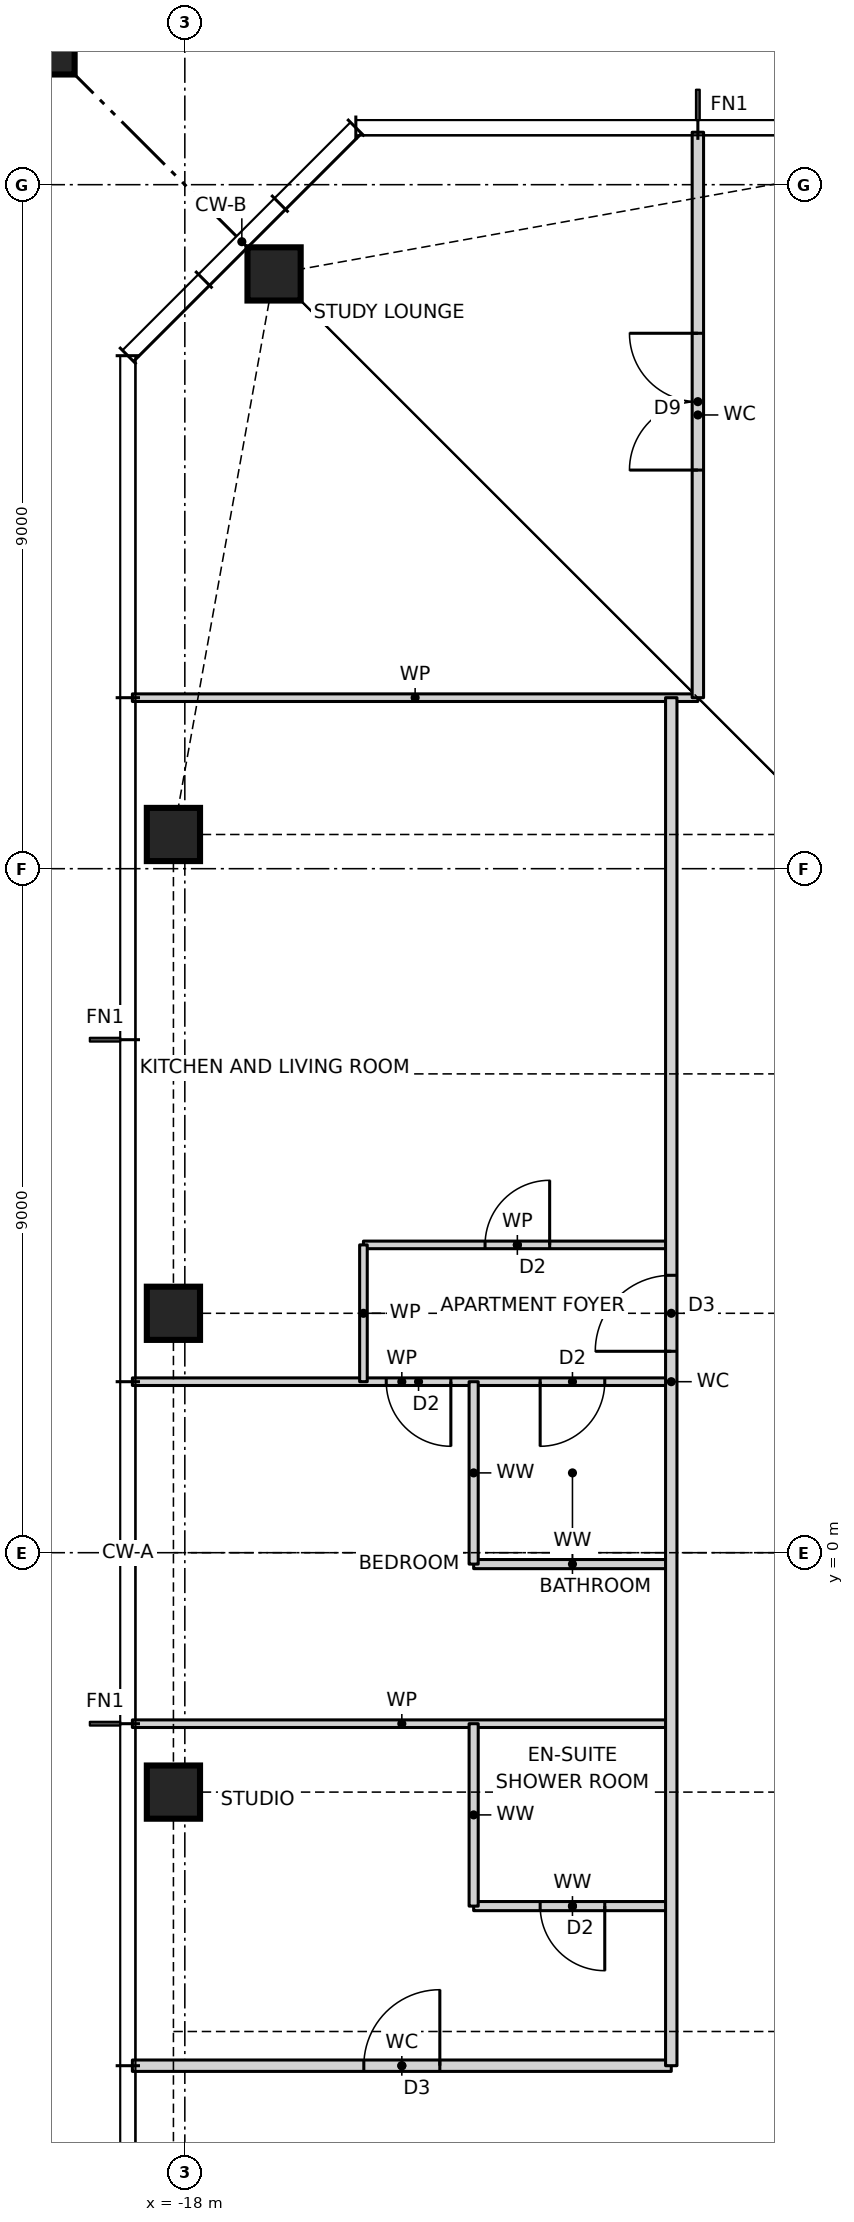
"""IFC4 building model, lengths in metres.
Left out: names, types, materials, properties, quantities, classifications, styles, units other than length and angle.
Written with IfcOpenShell. Run it as: python <this file> out.ifc"""

import sys

from ifc_helpers import new_model, si_unit, direction, frame, frame_2d, origin, origin_2d, place, context, subcontext, project, spatial, rectangle, hollow_rectangle, i_section, extrude, element, fill, save


model = new_model("IFC4")
c1 = context("Model", 3, precision=1e-05, world=origin(), true_north=direction((0.0, 1.0)))
c2 = subcontext(c1, "Body", "Model", "MODEL_VIEW")
j1 = project(units=[si_unit("LENGTHUNIT", "METRE"), si_unit("PLANEANGLEUNIT", "RADIAN")], contexts=[c1])
p1 = place(None, origin())
s1 = spatial("IfcSite", under=j1, at=p1, CompositionType="ELEMENT")
p2 = place(p1, origin())
s2 = spatial("IfcBuilding", under=s1, at=p2, CompositionType="ELEMENT")
p3 = place(p2, frame((0.0, 0.0, 167.0)))
s3 = spatial("IfcBuildingStorey", under=s2, at=p3, CompositionType="ELEMENT", Elevation=167.0)
for number, where, z_axis, x_axis in (
    (1, (-16.826, 16.826, 0.0), (0.0, 0.0, 1.0), (1.0, 0.0, 0.0)),
    (2, (-18.15, 9.45, 0.0), (0.0, 0.0, 1.0), (1.0, 0.0, 0.0)),
    (3, (-18.15, 3.15, 0.0), (0.0, 0.0, 1.0), (1.0, 0.0, 0.0)),
    (4, (-18.15, -3.15, 0.0), (0.0, 0.0, 1.0), (1.0, 0.0, 0.0)),
):
    element("IfcColumn", number, at=place(p3, frame(where, z_axis=z_axis, x_axis=x_axis)), inside=s3, PredefinedType="COLUMN", context=c2, shape_type="SweptSolid", body=[
        extrude(hollow_rectangle(XDim=0.7, YDim=0.7, WallThickness=0.06, at=origin_2d()), origin(), (0.0, 0.0, 1.0), 3.5),
    ])
p4 = place(p3, frame((-21.65, 21.65, 0.0), z_axis=(0.0, 0.0, 1.0), x_axis=(1.0, 0.0, 0.0)))
e5 = element("IfcColumn", 5, at=p4, inside=s3, PredefinedType="COLUMN", context=c2, shape_type="SweptSolid", body=[
    extrude(rectangle(XDim=4.4, YDim=4.4, at=origin_2d()), origin(), (0.0, 0.0, 1.0), 3.5),
    extrude(i_section(OverallWidth=0.478, OverallDepth=0.599, WebThickness=0.1, FlangeThickness=0.14, at=origin_2d()), origin(), (0.0, 0.0, 1.0), 3.5),
])
p5 = place(p3, frame((-18.69, -6.75, 0.0), z_axis=(0.0, 0.0, 1.0), x_axis=(1.0, 0.0, 0.0)))
e6 = element("IfcWall", 6, at=p5, inside=s3, PredefinedType="PARTITIONING", context=c2, shape_type="SweptSolid", body=[
    extrude(rectangle(XDim=7.09, YDim=0.15, at=frame_2d((3.545, 0.0))), origin(), (0.0, 0.0, 1.0), 3.27),
])
p6 = place(p5, frame((3.045, 0.0, 0.0)))
e7 = element("IfcOpeningElement", 7, at=p6, cuts=e6, PredefinedType="OPENING", context=c2, shape_type="SweptSolid", body=[
    extrude(rectangle(XDim=1.0, YDim=2.1, at=frame_2d((0.5, 1.05))), frame((0.0, 0.085, 0.0), z_axis=(0.0, -1.0, 0.0), x_axis=(1.0, 0.0, 0.0)), (0.0, 0.0, 1.0), 0.17),
])
p7 = place(p3, frame((-14.2, -4.65, 0.0), z_axis=(0.0, 0.0, 1.0), x_axis=(1.0, 0.0, 0.0)))
e8 = element("IfcWall", 8, at=p7, inside=s3, PredefinedType="PARTITIONING", context=c2, shape_type="SweptSolid", body=[
    extrude(rectangle(XDim=2.6, YDim=0.12, at=frame_2d((1.3, 0.0))), origin(), (0.0, 0.0, 1.0), 3.27),
])
p8 = place(p7, frame((0.875, 0.0, 0.0)))
e9 = element("IfcOpeningElement", 9, at=p8, cuts=e8, PredefinedType="OPENING", context=c2, shape_type="SweptSolid", body=[
    extrude(rectangle(XDim=0.85, YDim=2.1, at=frame_2d((0.425, 1.05))), frame((0.0, 0.07, 0.0), z_axis=(0.0, -1.0, 0.0), x_axis=(1.0, 0.0, 0.0)), (0.0, 0.0, 1.0), 0.14),
])
p9 = place(p3, frame((-18.69, -2.25, 0.0), z_axis=(0.0, 0.0, 1.0), x_axis=(1.0, 0.0, 0.0)))
e10 = element("IfcWall", 10, at=p9, inside=s3, PredefinedType="PARTITIONING", context=c2, shape_type="SweptSolid", body=[
    extrude(rectangle(XDim=7.09, YDim=0.1, at=frame_2d((3.545, 0.0))), origin(), (0.0, 0.0, 1.0), 3.27),
])
p10 = place(p3, frame((-14.2, -0.15, 0.0), z_axis=(0.0, 0.0, 1.0), x_axis=(1.0, 0.0, 0.0)))
e11 = element("IfcWall", 11, at=p10, inside=s3, PredefinedType="PARTITIONING", context=c2, shape_type="SweptSolid", body=[
    extrude(rectangle(XDim=2.6, YDim=0.12, at=frame_2d((1.3, 0.0))), origin(), (0.0, 0.0, 1.0), 3.27),
])
p11 = place(p3, frame((-18.69, 2.25, 0.0), z_axis=(0.0, 0.0, 1.0), x_axis=(1.0, 0.0, 0.0)))
e12 = element("IfcWall", 12, at=p11, inside=s3, PredefinedType="PARTITIONING", context=c2, shape_type="SweptSolid", body=[
    extrude(rectangle(XDim=7.09, YDim=0.1, at=frame_2d((3.545, 0.0))), origin(), (0.0, 0.0, 1.0), 3.27),
])
p12 = place(p11, frame((3.34, 0.0, 0.0)))
e13 = element("IfcOpeningElement", 13, at=p12, cuts=e12, PredefinedType="OPENING", context=c2, shape_type="SweptSolid", body=[
    extrude(rectangle(XDim=0.85, YDim=2.1, at=frame_2d((0.425, 1.05))), frame((0.0, 0.06, 0.0), z_axis=(0.0, -1.0, 0.0), x_axis=(1.0, 0.0, 0.0)), (0.0, 0.0, 1.0), 0.12),
])
p13 = place(p11, frame((5.365, 0.0, 0.0)))
e14 = element("IfcOpeningElement", 14, at=p13, cuts=e12, PredefinedType="OPENING", context=c2, shape_type="SweptSolid", body=[
    extrude(rectangle(XDim=0.85, YDim=2.1, at=frame_2d((0.425, 1.05))), frame((0.0, 0.06, 0.0), z_axis=(0.0, -1.0, 0.0), x_axis=(1.0, 0.0, 0.0)), (0.0, 0.0, 1.0), 0.12),
])
p14 = place(p3, frame((-15.65, 4.05, 0.0), z_axis=(0.0, 0.0, 1.0), x_axis=(1.0, 0.0, 0.0)))
e15 = element("IfcWall", 15, at=p14, inside=s3, PredefinedType="PARTITIONING", context=c2, shape_type="SweptSolid", body=[
    extrude(rectangle(XDim=4.05, YDim=0.1, at=frame_2d((2.025, 0.0))), origin(), (0.0, 0.0, 1.0), 3.27),
])
p15 = place(p14, frame((1.6, 0.0, 0.0)))
e16 = element("IfcOpeningElement", 16, at=p15, cuts=e15, PredefinedType="OPENING", context=c2, shape_type="SweptSolid", body=[
    extrude(rectangle(XDim=0.85, YDim=2.1, at=frame_2d((0.425, 1.05))), frame((0.0, 0.06, 0.0), z_axis=(0.0, -1.0, 0.0), x_axis=(1.0, 0.0, 0.0)), (0.0, 0.0, 1.0), 0.12),
])
p16 = place(p3, frame((-18.69, 11.25, 0.0), z_axis=(0.0, 0.0, 1.0), x_axis=(1.0, 0.0, 0.0)))
e17 = element("IfcWall", 17, at=p16, inside=s3, PredefinedType="PARTITIONING", context=c2, shape_type="SweptSolid", body=[
    extrude(rectangle(XDim=7.44, YDim=0.1, at=frame_2d((3.72, 0.0))), origin(), (0.0, 0.0, 1.0), 3.27),
])
p17 = place(p3, frame((-11.25, 11.25, 0.0), z_axis=(0.0, 0.0, 1.0), x_axis=(0.0, 1.0, 0.0)))
e18 = element("IfcWall", 18, at=p17, inside=s3, PredefinedType="PARTITIONING", context=c2, shape_type="SweptSolid", body=[
    extrude(rectangle(XDim=7.44, YDim=0.15, at=frame_2d((3.72, 0.0))), origin(), (0.0, 0.0, 1.0), 3.27),
])
p18 = place(p17, frame((2.995, 0.0, 0.0)))
e19 = element("IfcOpeningElement", 19, at=p18, cuts=e18, PredefinedType="OPENING", context=c2, shape_type="SweptSolid", body=[
    extrude(rectangle(XDim=1.8, YDim=2.1, at=frame_2d((0.9, 1.05))), frame((0.0, 0.085, 0.0), z_axis=(0.0, -1.0, 0.0), x_axis=(1.0, 0.0, 0.0)), (0.0, 0.0, 1.0), 0.17),
])
p19 = place(p3, frame((-11.6, -6.75, 0.0), z_axis=(0.0, 0.0, 1.0), x_axis=(0.0, 1.0, 0.0)))
e20 = element("IfcWall", 20, at=p19, inside=s3, PredefinedType="PARTITIONING", context=c2, shape_type="SweptSolid", body=[
    extrude(rectangle(XDim=18.0, YDim=0.15, at=frame_2d((9.0, 0.0))), origin(), (0.0, 0.0, 1.0), 3.27),
])
p20 = place(p19, frame((9.4, 0.0, 0.0)))
e21 = element("IfcOpeningElement", 21, at=p20, cuts=e20, PredefinedType="OPENING", context=c2, shape_type="SweptSolid", body=[
    extrude(rectangle(XDim=1.0, YDim=2.1, at=frame_2d((0.5, 1.05))), frame((0.0, 0.085, 0.0), z_axis=(0.0, -1.0, 0.0), x_axis=(1.0, 0.0, 0.0)), (0.0, 0.0, 1.0), 0.17),
])
for number, where, z_axis, x_axis in (
    (22, (-14.2, -4.65, 0.0), (0.0, 0.0, 1.0), (0.0, 1.0, 0.0)),
    (23, (-14.2, -0.15, 0.0), (0.0, 0.0, 1.0), (0.0, 1.0, 0.0)),
):
    element("IfcWall", number, at=place(p3, frame(where, z_axis=z_axis, x_axis=x_axis)), inside=s3, PredefinedType="PARTITIONING", context=c2, shape_type="SweptSolid", body=[
        extrude(rectangle(XDim=2.4, YDim=0.12, at=frame_2d((1.2, 0.0))), origin(), (0.0, 0.0, 1.0), 3.27),
    ])
p21 = place(p3, frame((-15.65, 2.25, 0.0), z_axis=(0.0, 0.0, 1.0), x_axis=(0.0, 1.0, 0.0)))
e24 = element("IfcWall", 24, at=p21, inside=s3, PredefinedType="PARTITIONING", context=c2, shape_type="SweptSolid", body=[
    extrude(rectangle(XDim=1.8, YDim=0.1, at=frame_2d((0.9, 0.0))), origin(), (0.0, 0.0, 1.0), 3.27),
])
p22 = place(p20, origin())
e25 = element("IfcDoor", 25, at=p22, inside=s3, OperationType="SINGLE_SWING_LEFT", PredefinedType="DOOR", context=c2, shape_type="SweptSolid", body=[
    extrude(rectangle(XDim=1.0, YDim=2.1, at=frame_2d((0.5, 1.05))), frame((0.0, 0.025, 0.0), z_axis=(0.0, -1.0, 0.0), x_axis=(1.0, 0.0, 0.0)), (0.0, 0.0, 1.0), 0.05),
])
fill(e21, e25)
p23 = place(p15, origin())
e26 = element("IfcDoor", 26, at=p23, inside=s3, OperationType="SINGLE_SWING_RIGHT", PredefinedType="DOOR", context=c2, shape_type="SweptSolid", body=[
    extrude(rectangle(XDim=0.85, YDim=2.1, at=frame_2d((0.425, 1.05))), frame((0.0, 0.025, 0.0), z_axis=(0.0, -1.0, 0.0), x_axis=(1.0, 0.0, 0.0)), (0.0, 0.0, 1.0), 0.05),
])
fill(e16, e26)
p24 = place(p12, frame((0.85, 0.0, 0.0), z_axis=(0.0, 0.0, 1.0), x_axis=(-1.0, 0.0, 0.0)))
e27 = element("IfcDoor", 27, at=p24, inside=s3, OperationType="SINGLE_SWING_LEFT", PredefinedType="DOOR", context=c2, shape_type="SweptSolid", body=[
    extrude(rectangle(XDim=0.85, YDim=2.1, at=frame_2d((0.425, 1.05))), frame((0.0, 0.025, 0.0), z_axis=(0.0, -1.0, 0.0), x_axis=(1.0, 0.0, 0.0)), (0.0, 0.0, 1.0), 0.05),
])
fill(e13, e27)
p25 = place(p13, frame((0.85, 0.0, 0.0), z_axis=(0.0, 0.0, 1.0), x_axis=(-1.0, 0.0, 0.0)))
e28 = element("IfcDoor", 28, at=p25, inside=s3, OperationType="SINGLE_SWING_RIGHT", PredefinedType="DOOR", context=c2, shape_type="SweptSolid", body=[
    extrude(rectangle(XDim=0.85, YDim=2.1, at=frame_2d((0.425, 1.05))), frame((0.0, 0.025, 0.0), z_axis=(0.0, -1.0, 0.0), x_axis=(1.0, 0.0, 0.0)), (0.0, 0.0, 1.0), 0.05),
])
fill(e14, e28)
p26 = place(p6, origin())
e29 = element("IfcDoor", 29, at=p26, inside=s3, OperationType="SINGLE_SWING_RIGHT", PredefinedType="DOOR", context=c2, shape_type="SweptSolid", body=[
    extrude(rectangle(XDim=1.0, YDim=2.1, at=frame_2d((0.5, 1.05))), frame((0.0, 0.025, 0.0), z_axis=(0.0, -1.0, 0.0), x_axis=(1.0, 0.0, 0.0)), (0.0, 0.0, 1.0), 0.05),
])
fill(e7, e29)
p27 = place(p8, frame((0.85, 0.0, 0.0), z_axis=(0.0, 0.0, 1.0), x_axis=(-1.0, 0.0, 0.0)))
e30 = element("IfcDoor", 30, at=p27, inside=s3, OperationType="SINGLE_SWING_LEFT", PredefinedType="DOOR", context=c2, shape_type="SweptSolid", body=[
    extrude(rectangle(XDim=0.85, YDim=2.1, at=frame_2d((0.425, 1.05))), frame((0.0, 0.025, 0.0), z_axis=(0.0, -1.0, 0.0), x_axis=(1.0, 0.0, 0.0)), (0.0, 0.0, 1.0), 0.05),
])
fill(e9, e30)
p28 = place(p18, origin())
e31 = element("IfcDoor", 31, at=p28, inside=s3, OperationType="DOUBLE_DOOR_SINGLE_SWING", PredefinedType="DOOR", context=c2, shape_type="SweptSolid", body=[
    extrude(rectangle(XDim=1.8, YDim=2.1, at=frame_2d((0.9, 1.05))), frame((0.0, 0.025, 0.0), z_axis=(0.0, -1.0, 0.0), x_axis=(1.0, 0.0, 0.0)), (0.0, 0.0, 1.0), 0.05),
])
fill(e19, e31)
save(model, sys.argv[1])
